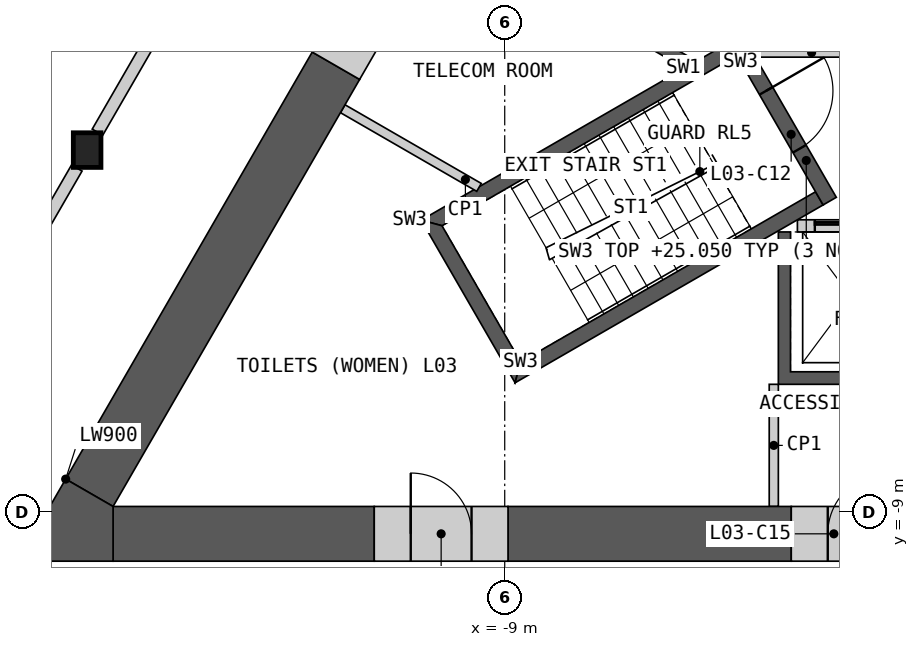
"""IFC4 building model, lengths in metres.
Left out: names, types, materials, properties, quantities, classifications, styles, units other than length and angle.
Written with IfcOpenShell. Run it as: python <this file> out.ifc"""

import sys

from ifc_helpers import new_model, si_unit, direction, frame, frame_2d, origin, origin_2d, place, context, subcontext, project, spatial, polyline, rectangle, i_section, outline, extrude, element, fill, save


model = new_model("IFC4")
c1 = context("Model", 3, precision=1e-05, world=origin(), true_north=direction((0.0, 1.0)))
c2 = subcontext(c1, "Body", "Model", "MODEL_VIEW")
j1 = project(units=[si_unit("LENGTHUNIT", "METRE"), si_unit("PLANEANGLEUNIT", "RADIAN")], contexts=[c1])
p1 = place(None, origin())
s1 = spatial("IfcSite", under=j1, at=p1, CompositionType="ELEMENT")
p2 = place(p1, origin())
s2 = spatial("IfcBuilding", under=s1, at=p2, CompositionType="ELEMENT")
p3 = place(p2, frame((0.0, 0.0, 21.0)))
s3 = spatial("IfcBuildingStorey", under=s2, at=p3, CompositionType="ELEMENT", Elevation=21.0)
p4 = place(p3, frame((-15.868, -3.054, 0.0), z_axis=(0.0, 0.0, 1.0), x_axis=(1.0, 0.0, 0.0)))
e1 = element("IfcColumn", 1, at=p4, inside=s3, PredefinedType="COLUMN", context=c2, shape_type="SweptSolid", body=[
    extrude(i_section(OverallWidth=0.454, OverallDepth=0.57, WebThickness=0.078, FlangeThickness=0.125, at=origin_2d()), origin(), (0.0, 0.0, 1.0), 4.5),
])
p5 = place(p3, origin())
e2 = element("IfcWall", 2, at=p5, inside=s3, PredefinedType="SHEAR", context=c2, shape_type="SweptSolid", body=[
    extrude(outline(polyline([(4.5, -4.4), (4.5, -6.906), (-4.5, -6.906), (-4.5, -4.4), (-4.3, -4.4), (-4.3, -6.7), (-2.3, -6.7), (-2.3, -4.4), (-2.1, -4.4), (-2.1, -6.7), (-0.1, -6.7), (-0.1, -4.4), (0.1, -4.4), (0.1, -6.7), (2.1, -6.7), (2.1, -4.4), (2.3, -4.4), (2.3, -6.7), (4.3, -6.7), (4.3, -4.4), (4.5, -4.4)])), origin(), (0.0, 0.0, 1.0), 4.05),
])
p6 = place(p3, frame((-4.187, -4.3, 0.0), z_axis=(0.0, 0.0, 1.0), x_axis=(1.0, 0.0, 0.0)))
e3 = element("IfcWall", 3, at=p6, inside=s3, PredefinedType="SOLIDWALL", context=c2, shape_type="SweptSolid", body=[
    extrude(rectangle(XDim=8.373, YDim=0.2, at=frame_2d((4.187, 0.0))), origin(), (0.0, 0.0, 1.0), 4.05),
])
p7 = place(p6, frame((0.287, 0.0, 0.0)))
e4 = element("IfcOpeningElement", 4, at=p7, cuts=e3, PredefinedType="OPENING", context=c2, shape_type="SweptSolid", body=[
    extrude(rectangle(XDim=1.2, YDim=2.1, at=frame_2d((0.6, 1.05))), frame((0.0, 0.11, 0.0), z_axis=(0.0, -1.0, 0.0), x_axis=(1.0, 0.0, 0.0)), (0.0, 0.0, 1.0), 0.22),
])
p8 = place(p6, frame((2.387, 0.0, 0.0)))
e5 = element("IfcOpeningElement", 5, at=p8, cuts=e3, PredefinedType="OPENING", context=c2, shape_type="SweptSolid", body=[
    extrude(rectangle(XDim=1.4, YDim=2.1, at=frame_2d((0.7, 1.05))), frame((0.0, 0.11, 0.0), z_axis=(0.0, -1.0, 0.0), x_axis=(1.0, 0.0, 0.0)), (0.0, 0.0, 1.0), 0.22),
])
p9 = place(p6, frame((4.737, 0.0, 0.0)))
e6 = element("IfcOpeningElement", 6, at=p9, cuts=e3, PredefinedType="OPENING", context=c2, shape_type="SweptSolid", body=[
    extrude(rectangle(XDim=1.1, YDim=2.1, at=frame_2d((0.55, 1.05))), frame((0.0, 0.11, 0.0), z_axis=(0.0, -1.0, 0.0), x_axis=(1.0, 0.0, 0.0)), (0.0, 0.0, 1.0), 0.22),
])
p10 = place(p6, frame((6.887, 0.0, 0.0)))
e7 = element("IfcOpeningElement", 7, at=p10, cuts=e3, PredefinedType="OPENING", context=c2, shape_type="SweptSolid", body=[
    extrude(rectangle(XDim=1.2, YDim=2.1, at=frame_2d((0.6, 1.05))), frame((0.0, 0.11, 0.0), z_axis=(0.0, -1.0, 0.0), x_axis=(1.0, 0.0, 0.0)), (0.0, 0.0, 1.0), 0.22),
])
p11 = place(p3, origin())
e8 = element("IfcWall", 8, at=p11, inside=s3, PredefinedType="SHEAR", context=c2, shape_type="SweptSolid", body=[
    extrude(outline(polyline([(-6.061, -1.697), (-8.231, -0.444), (-8.131, -0.271), (-5.96, -1.524), (-6.061, -1.697)])), origin(), (0.0, 0.0, 1.0), 4.05),
])
p12 = place(p3, frame((-4.941, -1.45, 0.0), z_axis=(0.0, 0.0, 1.0), x_axis=(1.0, 0.0, 0.0)))
e9 = element("IfcWall", 9, at=p12, inside=s3, PredefinedType="PARTITIONING", context=c2, shape_type="SweptSolid", body=[
    extrude(rectangle(XDim=9.882, YDim=0.15, at=frame_2d((4.941, 0.0))), origin(), (0.0, 0.0, 1.0), 4.05),
])
p13 = place(p12, frame((4.391, 0.0, 0.0)))
e10 = element("IfcOpeningElement", 10, at=p13, cuts=e9, PredefinedType="OPENING", context=c2, shape_type="SweptSolid", body=[
    extrude(rectangle(XDim=1.1, YDim=2.1, at=frame_2d((0.55, 1.05))), frame((0.0, 0.085, 0.0), z_axis=(0.0, -1.0, 0.0), x_axis=(1.0, 0.0, 0.0)), (0.0, 0.0, 1.0), 0.17),
])
p14 = place(p3, origin())
e11 = element("IfcWall", 11, at=p14, inside=s3, PredefinedType="SHEAR", context=c2, shape_type="SweptSolid", body=[
    extrude(outline(polyline([(-5.307, -1.281), (-10.374, -4.206), (-10.032, -4.298), (-5.182, -1.498), (-5.307, -1.281)])), origin(), (0.0, 0.0, 1.0), 4.05),
])
p15 = place(p3, origin())
e12 = element("IfcWall", 12, at=p15, inside=s3, PredefinedType="SHEAR", context=c2, shape_type="SweptSolid", body=[
    extrude(outline(polyline([(-10.374, -4.206), (-8.83, -6.881), (-8.738, -6.539), (-10.032, -4.298), (-10.374, -4.206)])), origin(), (0.0, 0.0, 1.0), 4.05),
])
p16 = place(p3, origin())
e13 = element("IfcWall", 13, at=p16, inside=s3, PredefinedType="SHEAR", context=c2, shape_type="SweptSolid", body=[
    extrude(outline(polyline([(-8.738, -6.539), (-8.83, -6.881), (-3.763, -3.956), (-3.888, -3.739), (-8.738, -6.539)])), origin(), (0.0, 0.0, 1.0), 4.05),
])
p17 = place(p3, frame((-5.199, -1.219, 0.0), z_axis=(0.0, 0.0, 1.0), x_axis=(0.499982516597, -0.866035497597, 0.0)))
e14 = element("IfcWall", 14, at=p17, inside=s3, PredefinedType="SHEAR", context=c2, shape_type="SweptSolid", body=[
    extrude(rectangle(XDim=3.088, YDim=0.25, at=frame_2d((1.544, 0.0))), origin(), (0.0, 0.0, 1.0), 4.05),
])
p18 = place(p17, frame((0.994, 0.0, 0.0)))
e15 = element("IfcOpeningElement", 15, at=p18, cuts=e14, PredefinedType="OPENING", context=c2, shape_type="SweptSolid", body=[
    extrude(rectangle(XDim=1.1, YDim=2.1, at=frame_2d((0.55, 1.05))), frame((0.0, 0.135, 0.0), z_axis=(0.0, -1.0, 0.0), x_axis=(1.0, 0.0, 0.0)), (0.0, 0.0, 1.0), 0.27),
])
p19 = place(p3, frame((-4.575, -6.906, 0.0), z_axis=(0.0, 0.0, 1.0), x_axis=(0.0, -1.0, 0.0)))
e16 = element("IfcWall", 16, at=p19, inside=s3, PredefinedType="PARTITIONING", context=c2, shape_type="SweptSolid", body=[
    extrude(rectangle(XDim=2.009, YDim=0.15, at=frame_2d((1.004, 0.0))), origin(), (0.0, 0.0, 1.0), 4.05),
])
p20 = place(p3, frame((-11.664, -2.373, 0.0), z_axis=(0.0, 0.0, 1.0), x_axis=(0.866075643493, -0.499912972175, 0.0)))
e17 = element("IfcWall", 17, at=p20, inside=s3, PredefinedType="PARTITIONING", context=c2, shape_type="SweptSolid", body=[
    extrude(rectangle(XDim=2.588, YDim=0.15, at=frame_2d((1.294, 0.0))), origin(), (0.0, 0.0, 1.0), 4.05),
])
p21 = place(p3, frame((-8.946, -9.365, 0.0), z_axis=(0.0, 0.0, 1.0), x_axis=(1.0, 0.0, 0.0)))
e18 = element("IfcWall", 18, at=p21, inside=s3, PredefinedType="SHEAR", context=c2, shape_type="SweptSolid", body=[
    extrude(rectangle(XDim=4.658, YDim=0.9, at=frame_2d((2.329, 0.0))), origin(), (0.0, 0.0, 1.0), 4.05),
])
p22 = place(p3, frame((-15.441, -9.365, 0.0), z_axis=(0.0, 0.0, 1.0), x_axis=(1.0, 0.0, 0.0)))
e19 = element("IfcWall", 19, at=p22, inside=s3, PredefinedType="SHEAR", context=c2, shape_type="SweptSolid", body=[
    extrude(rectangle(XDim=4.296, YDim=0.9, at=frame_2d((2.148, 0.0))), origin(), (0.0, 0.0, 1.0), 4.05),
])
p23 = place(p3, frame((-11.776, -1.667, 0.0), z_axis=(0.0, 0.0, 1.0), x_axis=(-0.499995201193, -0.866028174359, 0.0)))
e20 = element("IfcWall", 20, at=p23, inside=s3, PredefinedType="SHEAR", context=c2, shape_type="SweptSolid", body=[
    extrude(rectangle(XDim=8.11, YDim=0.9, at=frame_2d((4.055, 0.0))), origin(), (0.0, 0.0, 1.0), 4.05),
])
p24 = place(p3, origin())
e21 = element("IfcWall", 21, at=p24, inside=s3, PredefinedType="SHEAR", context=c2, shape_type="SweptSolid", body=[
    extrude(outline(polyline([(-16.221, -8.465), (-15.441, -8.915), (-15.441, -9.815), (-17.0, -9.815), (-16.221, -8.465)])), origin(), (0.0, 0.0, 1.0), 4.05),
])
p25 = place(p3, frame((-4.288, -9.365, 0.0), z_axis=(0.0, 0.0, 1.0), x_axis=(1.0, 0.0, 0.0)))
e22 = element("IfcWall", 22, at=p25, inside=s3, PredefinedType="SHEAR", context=c2, shape_type="SweptSolid", body=[
    extrude(rectangle(XDim=2.2, YDim=0.9, at=frame_2d((1.1, 0.0))), origin(), (0.0, 0.0, 1.0), 4.05),
])
p26 = place(p25, frame((0.6, 0.0, 0.0)))
e23 = element("IfcOpeningElement", 23, at=p26, cuts=e22, PredefinedType="OPENING", context=c2, shape_type="SweptSolid", body=[
    extrude(rectangle(XDim=1.0, YDim=2.1, at=frame_2d((0.5, 1.05))), frame((0.0, 0.46, 0.0), z_axis=(0.0, -1.0, 0.0), x_axis=(1.0, 0.0, 0.0)), (0.0, 0.0, 1.0), 0.92),
])
p27 = place(p3, frame((-11.146, -9.365, 0.0), z_axis=(0.0, 0.0, 1.0), x_axis=(1.0, 0.0, 0.0)))
e24 = element("IfcWall", 24, at=p27, inside=s3, PredefinedType="SHEAR", context=c2, shape_type="SweptSolid", body=[
    extrude(rectangle(XDim=2.2, YDim=0.9, at=frame_2d((1.1, 0.0))), origin(), (0.0, 0.0, 1.0), 4.05),
])
p28 = place(p27, frame((0.6, 0.0, 0.0)))
e25 = element("IfcOpeningElement", 25, at=p28, cuts=e24, PredefinedType="OPENING", context=c2, shape_type="SweptSolid", body=[
    extrude(rectangle(XDim=1.0, YDim=2.1, at=frame_2d((0.5, 1.05))), frame((0.0, 0.46, 0.0), z_axis=(0.0, -1.0, 0.0), x_axis=(1.0, 0.0, 0.0)), (0.0, 0.0, 1.0), 0.92),
])
p29 = place(p3, frame((-10.31, 0.872, 0.0), z_axis=(0.0, 0.0, 1.0), x_axis=(-0.499982003349, -0.866035793907, 0.0)))
e26 = element("IfcWall", 26, at=p29, inside=s3, PredefinedType="SHEAR", context=c2, shape_type="SweptSolid", body=[
    extrude(rectangle(XDim=2.931, YDim=0.9, at=frame_2d((1.466, 0.0))), origin(), (0.0, 0.0, 1.0), 4.05),
])
p30 = place(p29, frame((1.35, 0.0, 0.0)))
e27 = element("IfcOpeningElement", 27, at=p30, cuts=e26, PredefinedType="OPENING", context=c2, shape_type="SweptSolid", body=[
    extrude(rectangle(XDim=1.0, YDim=2.1, at=frame_2d((0.5, 1.05))), frame((0.0, 0.46, 0.0), z_axis=(0.0, -1.0, 0.0), x_axis=(1.0, 0.0, 0.0)), (0.0, 0.0, 1.0), 0.92),
])
p31 = place(p3, frame((-15.698, -2.759, 0.0), z_axis=(0.0, 0.0, 1.0), x_axis=(0.500004292778, 0.866022925334, 0.0)))
e28 = element("IfcWall", 28, at=p31, inside=s3, PredefinedType="PARTITIONING", context=c2, shape_type="SweptSolid", body=[
    extrude(rectangle(XDim=9.898, YDim=0.2, at=frame_2d((4.949, 0.0))), origin(), (0.0, 0.0, 1.0), 4.05),
])
p32 = place(p31, frame((4.1, 0.0, 0.0)))
e29 = element("IfcOpeningElement", 29, at=p32, cuts=e28, PredefinedType="OPENING", context=c2, shape_type="SweptSolid", body=[
    extrude(rectangle(XDim=1.8, YDim=2.1, at=frame_2d((0.9, 1.05))), frame((0.0, 0.11, 0.0), z_axis=(0.0, -1.0, 0.0), x_axis=(1.0, 0.0, 0.0)), (0.0, 0.0, 1.0), 0.22),
])
p33 = place(p3, frame((-19.244, -8.902, 0.0), z_axis=(0.0, 0.0, 1.0), x_axis=(0.499988314375, 0.866032150378, 0.0)))
e30 = element("IfcWall", 30, at=p33, inside=s3, PredefinedType="PARTITIONING", context=c2, shape_type="SweptSolid", body=[
    extrude(rectangle(XDim=6.412, YDim=0.2, at=frame_2d((3.206, 0.0))), origin(), (0.0, 0.0, 1.0), 4.05),
])
p34 = place(p7, origin())
e31 = element("IfcDoor", 31, at=p34, inside=s3, OperationType="SLIDING_TO_LEFT", PredefinedType="DOOR", context=c2, shape_type="SweptSolid", body=[
    extrude(rectangle(XDim=1.2, YDim=2.1, at=frame_2d((0.6, 1.05))), frame((0.0, 0.025, 0.0), z_axis=(0.0, -1.0, 0.0), x_axis=(1.0, 0.0, 0.0)), (0.0, 0.0, 1.0), 0.05),
])
fill(e4, e31)
p35 = place(p18, origin())
e32 = element("IfcDoor", 32, at=p35, inside=s3, OperationType="SINGLE_SWING_LEFT", PredefinedType="DOOR", context=c2, shape_type="SweptSolid", body=[
    extrude(rectangle(XDim=1.1, YDim=2.1, at=frame_2d((0.55, 1.05))), frame((0.0, 0.025, 0.0), z_axis=(0.0, -1.0, 0.0), x_axis=(1.0, 0.0, 0.0)), (0.0, 0.0, 1.0), 0.05),
])
fill(e15, e32)
p36 = place(p26, origin())
e33 = element("IfcDoor", 33, at=p36, inside=s3, OperationType="SINGLE_SWING_RIGHT", PredefinedType="DOOR", context=c2, shape_type="SweptSolid", body=[
    extrude(rectangle(XDim=1.0, YDim=2.1, at=frame_2d((0.5, 1.05))), frame((0.0, 0.205, 0.0), z_axis=(0.0, -1.0, 0.0), x_axis=(1.0, 0.0, 0.0)), (0.0, 0.0, 1.0), 0.05),
])
fill(e23, e33)
p37 = place(p28, origin())
e34 = element("IfcDoor", 34, at=p37, inside=s3, OperationType="SINGLE_SWING_LEFT", PredefinedType="DOOR", context=c2, shape_type="SweptSolid", body=[
    extrude(rectangle(XDim=1.0, YDim=2.1, at=frame_2d((0.5, 1.05))), frame((0.0, 0.205, 0.0), z_axis=(0.0, -1.0, 0.0), x_axis=(1.0, 0.0, 0.0)), (0.0, 0.0, 1.0), 0.05),
])
fill(e25, e34)
save(model, sys.argv[1])
